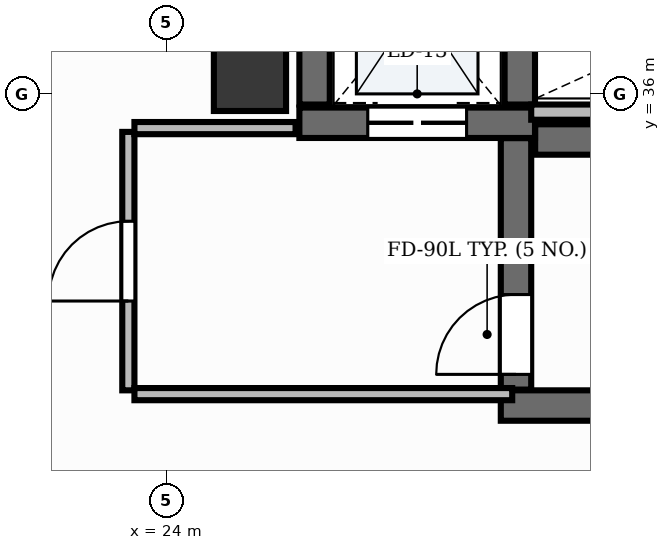
"""IFC4 building model, lengths in metres.
Left out: names, types, materials, properties, quantities, classifications, styles, units other than length and angle.
Written with IfcOpenShell. Run it as: python <this file> out.ifc"""

import sys

from ifc_helpers import new_model, si_unit, direction, frame, frame_2d, origin, origin_2d, place, context, subcontext, project, spatial, rectangle, extrude, element, fill, save


model = new_model("IFC4")
c1 = context("Model", 3, precision=1e-05, world=origin(), true_north=direction((0.0, 1.0)))
c2 = subcontext(c1, "Body", "Model", "MODEL_VIEW")
j1 = project(units=[si_unit("LENGTHUNIT", "METRE"), si_unit("PLANEANGLEUNIT", "RADIAN")], contexts=[c1])
p1 = place(None, origin())
s1 = spatial("IfcSite", under=j1, at=p1, CompositionType="ELEMENT")
p2 = place(p1, origin())
s2 = spatial("IfcBuilding", under=s1, at=p2, CompositionType="ELEMENT")
p3 = place(p2, frame((0.0, 0.0, 222.6)))
s3 = spatial("IfcBuildingStorey", under=s2, at=p3, CompositionType="ELEMENT", Elevation=222.6)
p4 = place(p3, frame((28.852, 35.4, 0.0), z_axis=(0.0, 0.0, 1.0), x_axis=(1.0, 0.0, 0.0)))
e1 = element("IfcWall", 1, at=p4, inside=s3, PredefinedType="SHEAR", context=c2, shape_type="SweptSolid", body=[
    extrude(rectangle(XDim=8.198, YDim=0.4, at=frame_2d((4.099, 0.0))), origin(), (0.0, 0.0, 1.0), 3.9),
])
p5 = place(p3, frame((28.4, 31.9, 0.0), z_axis=(0.0, 0.0, 1.0), x_axis=(1.0, 0.0, 0.0)))
e2 = element("IfcWall", 2, at=p5, inside=s3, PredefinedType="SHEAR", context=c2, shape_type="SweptSolid", body=[
    extrude(rectangle(XDim=8.65, YDim=0.4, at=frame_2d((4.325, 0.0))), origin(), (0.0, 0.0, 1.0), 3.9),
])
p6 = place(p3, frame((28.6, 32.11, 0.0), z_axis=(0.0, 0.0, 1.0), x_axis=(0.0, 1.0, 0.0)))
e3 = element("IfcWall", 3, at=p6, inside=s3, PredefinedType="SHEAR", context=c2, shape_type="SweptSolid", body=[
    extrude(rectangle(XDim=3.308, YDim=0.4, at=frame_2d((1.654, 0.0))), origin(), (0.0, 0.0, 1.0), 3.9),
])
p7 = place(p6, frame((0.2, 0.0, 0.0)))
e4 = element("IfcOpeningElement", 4, at=p7, cuts=e3, PredefinedType="OPENING", context=c2, shape_type="SweptSolid", body=[
    extrude(rectangle(XDim=1.05, YDim=2.15, at=frame_2d((0.525, 1.075))), frame((0.0, 0.215, 0.0), z_axis=(0.0, -1.0, 0.0), x_axis=(1.0, 0.0, 0.0)), (0.0, 0.0, 1.0), 0.43),
])
p8 = place(p3, frame((25.75, 35.62, 0.0), z_axis=(0.0, 0.0, 1.0), x_axis=(1.0, 0.0, 0.0)))
e5 = element("IfcWall", 5, at=p8, inside=s3, PredefinedType="SHEAR", context=c2, shape_type="SweptSolid", body=[
    extrude(rectangle(XDim=3.1, YDim=0.4, at=frame_2d((1.55, 0.0))), origin(), (0.0, 0.0, 1.0), 3.9),
])
p9 = place(p8, frame((0.9, 0.0, 0.0)))
e6 = element("IfcOpeningElement", 6, at=p9, cuts=e5, PredefinedType="OPENING", context=c2, shape_type="SweptSolid", body=[
    extrude(rectangle(XDim=1.3, YDim=2.2, at=frame_2d((0.65, 1.1))), frame((0.0, 0.215, 0.0), z_axis=(0.0, -1.0, 0.0), x_axis=(1.0, 0.0, 0.0)), (0.0, 0.0, 1.0), 0.43),
])
for number, where, z_axis, x_axis in (
    (7, (25.95, 35.86, 0.0), (0.0, 0.0, 1.0), (0.0, 1.0, 0.0)),
    (8, (28.65, 35.86, 0.0), (0.0, 0.0, 1.0), (0.0, 1.0, 0.0)),
):
    element("IfcWall", number, at=place(p3, frame(where, z_axis=z_axis, x_axis=x_axis)), inside=s3, PredefinedType="SHEAR", context=c2, shape_type="SweptSolid", body=[
        extrude(rectangle(XDim=2.7, YDim=0.4, at=frame_2d((1.35, 0.0))), origin(), (0.0, 0.0, 1.0), 3.9),
    ])
p10 = place(p3, frame((25.1, 36.25, -0.0), z_axis=(0.0, 0.0, 1.0), x_axis=(1.0, 0.0, 0.0)))
e9 = element("IfcColumn", 9, at=p10, inside=s3, PredefinedType="PILASTER", context=c2, shape_type="SweptSolid", body=[
    extrude(rectangle(XDim=0.95, YDim=0.95, at=origin_2d()), origin(), (0.0, 0.0, 1.0), 3.901),
])
p11 = place(p3, frame((28.8, 35.76, 0.0), z_axis=(0.0, 0.0, 1.0), x_axis=(1.0, 0.0, 0.0)))
e10 = element("IfcWall", 10, at=p11, inside=s3, PredefinedType="PARTITIONING", context=c2, shape_type="SweptSolid", body=[
    extrude(rectangle(XDim=4.57, YDim=0.2, at=frame_2d((2.285, 0.0))), origin(), (0.0, 0.0, 1.0), 2.91),
])
p12 = place(p3, frame((23.5, 32.1, 0.0), z_axis=(0.0, 0.0, 1.0), x_axis=(0.0, 1.0, 0.0)))
e11 = element("IfcWall", 11, at=p12, inside=s3, PredefinedType="PARTITIONING", context=c2, shape_type="SweptSolid", body=[
    extrude(rectangle(XDim=3.4, YDim=0.16, at=frame_2d((1.7, 0.0))), origin(), (0.0, 0.0, 1.0), 2.91),
])
p13 = place(p12, frame((1.175, 0.0, 0.0)))
e12 = element("IfcOpeningElement", 12, at=p13, cuts=e11, PredefinedType="OPENING", context=c2, shape_type="SweptSolid", body=[
    extrude(rectangle(XDim=1.05, YDim=2.15, at=frame_2d((0.525, 1.075))), frame((0.0, 0.095, 0.0), z_axis=(0.0, -1.0, 0.0), x_axis=(1.0, 0.0, 0.0)), (0.0, 0.0, 1.0), 0.19),
])
p14 = place(p3, frame((23.58, 32.05, 0.0), z_axis=(0.0, 0.0, 1.0), x_axis=(1.0, 0.0, 0.0)))
e13 = element("IfcWall", 13, at=p14, inside=s3, PredefinedType="PARTITIONING", context=c2, shape_type="SweptSolid", body=[
    extrude(rectangle(XDim=4.97, YDim=0.16, at=frame_2d((2.485, 0.0))), origin(), (0.0, 0.0, 1.0), 2.91),
])
p15 = place(p3, frame((23.58, 35.55, 0.0), z_axis=(0.0, 0.0, 1.0), x_axis=(1.0, 0.0, 0.0)))
e14 = element("IfcWall", 14, at=p15, inside=s3, PredefinedType="PARTITIONING", context=c2, shape_type="SweptSolid", body=[
    extrude(rectangle(XDim=2.12, YDim=0.16, at=frame_2d((1.06, 0.0))), origin(), (0.0, 0.0, 1.0), 2.91),
])
p16 = place(p7, origin())
e15 = element("IfcDoor", 15, at=p16, inside=s3, OperationType="SINGLE_SWING_LEFT", PredefinedType="DOOR", context=c2, shape_type="SweptSolid", body=[
    extrude(rectangle(XDim=1.05, YDim=2.15, at=frame_2d((0.525, 1.075))), frame((0.0, 0.025, 0.0), z_axis=(0.0, -1.0, 0.0), x_axis=(1.0, 0.0, 0.0)), (0.0, 0.0, 1.0), 0.05),
])
fill(e4, e15)
p17 = place(p9, origin())
e16 = element("IfcDoor", 16, at=p17, inside=s3, OperationType="DOUBLE_DOOR_SLIDING", PredefinedType="DOOR", context=c2, shape_type="SweptSolid", body=[
    extrude(rectangle(XDim=1.3, YDim=2.2, at=frame_2d((0.65, 1.1))), frame((0.0, 0.025, 0.0), z_axis=(0.0, -1.0, 0.0), x_axis=(1.0, 0.0, 0.0)), (0.0, 0.0, 1.0), 0.05),
])
fill(e6, e16)
p18 = place(p13, origin())
e17 = element("IfcDoor", 17, at=p18, inside=s3, OperationType="SINGLE_SWING_LEFT", PredefinedType="DOOR", context=c2, shape_type="SweptSolid", body=[
    extrude(rectangle(XDim=1.05, YDim=2.15, at=frame_2d((0.525, 1.075))), frame((0.0, 0.025, 0.0), z_axis=(0.0, -1.0, 0.0), x_axis=(1.0, 0.0, 0.0)), (0.0, 0.0, 1.0), 0.05),
])
fill(e12, e17)
save(model, sys.argv[1])
